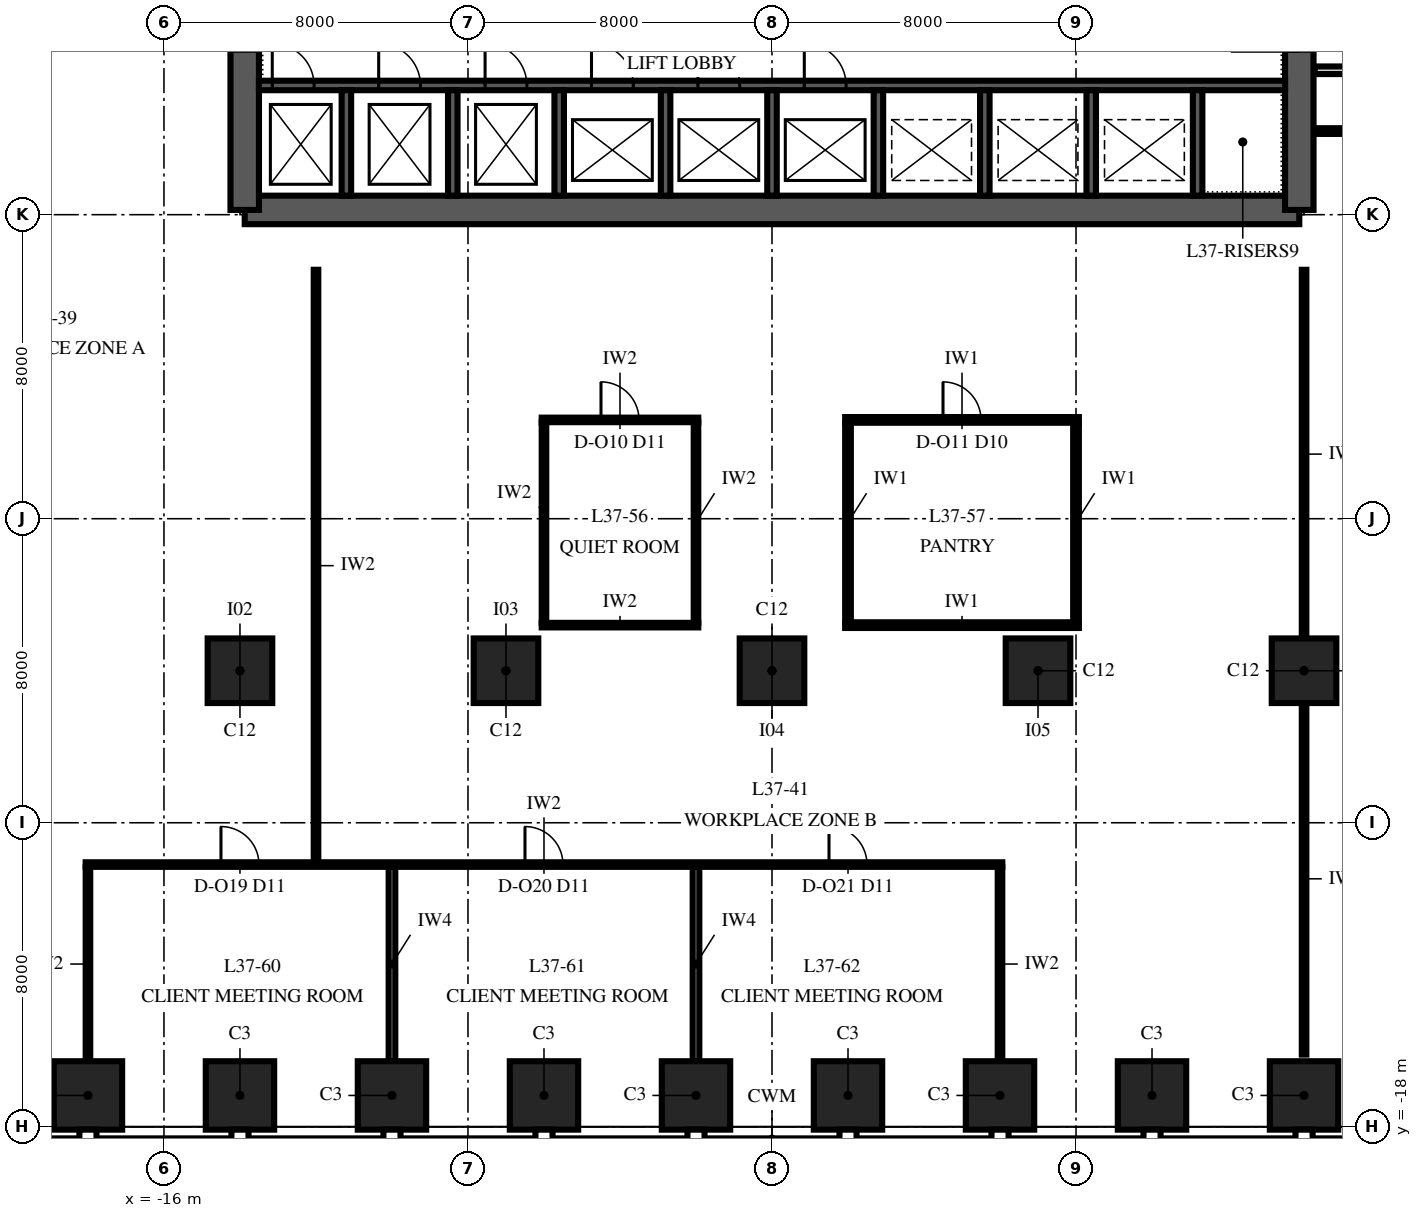
"""IFC4 building model, lengths in metres.
Left out: names, types, materials, properties, quantities, classifications, styles, units other than length and angle.
Written with IfcOpenShell. Run it as: python <this file> out.ifc"""

import sys

from ifc_helpers import new_model, si_unit, direction, frame, frame_2d, origin, origin_2d, place, context, subcontext, project, spatial, polyline, rectangle, outline, extrude, element, fill, save


model = new_model("IFC4")
c1 = context("Model", 3, precision=1e-05, world=origin(), true_north=direction((0.0, 1.0)))
c2 = subcontext(c1, "Body", "Model", "MODEL_VIEW")
j1 = project(units=[si_unit("LENGTHUNIT", "METRE"), si_unit("PLANEANGLEUNIT", "RADIAN")], contexts=[c1])
p1 = place(None, origin())
s1 = spatial("IfcSite", under=j1, at=p1, CompositionType="ELEMENT")
p2 = place(p1, origin())
s2 = spatial("IfcBuilding", under=s1, at=p2, CompositionType="ELEMENT")
p3 = place(p2, frame((0.0, 0.0, 163.0)))
s3 = spatial("IfcBuildingStorey", under=s2, at=p3, CompositionType="ELEMENT", Elevation=163.0)
for number, where, z_axis, x_axis in (
    (1, (-18.0, -17.175, 0.0), (0.0, 0.0, 1.0), (1.0, 0.0, 0.0)),
    (2, (-14.0, -17.175, 0.0), (0.0, 0.0, 1.0), (1.0, 0.0, 0.0)),
    (3, (-10.0, -17.175, 0.0), (0.0, 0.0, 1.0), (1.0, 0.0, 0.0)),
    (4, (-6.0, -17.175, 0.0), (0.0, 0.0, 1.0), (1.0, 0.0, 0.0)),
    (5, (-2.0, -17.175, 0.0), (0.0, 0.0, 1.0), (1.0, 0.0, 0.0)),
    (6, (2.0, -17.175, 0.0), (0.0, 0.0, 1.0), (1.0, 0.0, 0.0)),
    (7, (6.0, -17.175, 0.0), (0.0, 0.0, 1.0), (1.0, 0.0, 0.0)),
    (8, (10.0, -17.175, 0.0), (0.0, 0.0, 1.0), (1.0, 0.0, 0.0)),
    (9, (14.0, -17.175, 0.0), (0.0, 0.0, 1.0), (1.0, 0.0, 0.0)),
):
    element("IfcColumn", number, at=place(p3, frame(where, z_axis=z_axis, x_axis=x_axis)), inside=s3, PredefinedType="COLUMN", context=c2, shape_type="SweptSolid", body=[
        extrude(rectangle(XDim=1.8, YDim=1.8, at=origin_2d()), origin(), (0.0, 0.0, 1.0), 4.0),
    ])
for number, where, z_axis, x_axis in (
    (10, (-14.0, -6.0, 0.0), (0.0, 0.0, 1.0), (1.0, 0.0, 0.0)),
    (11, (-7.0, -6.0, 0.0), (0.0, 0.0, 1.0), (1.0, 0.0, 0.0)),
    (12, (0.0, -6.0, 0.0), (0.0, 0.0, 1.0), (1.0, 0.0, 0.0)),
    (13, (7.0, -6.0, 0.0), (0.0, 0.0, 1.0), (1.0, 0.0, 0.0)),
    (14, (14.0, -6.0, 0.0), (0.0, 0.0, 1.0), (1.0, 0.0, 0.0)),
):
    element("IfcColumn", number, at=place(p3, frame(where, z_axis=z_axis, x_axis=x_axis)), inside=s3, PredefinedType="COLUMN", context=c2, shape_type="SweptSolid", body=[
        extrude(rectangle(XDim=1.7, YDim=1.7, at=origin_2d()), origin(), (0.0, 0.0, 1.0), 4.0),
    ])
p4 = place(p3, frame((-13.875, 6.125, 0.0), z_axis=(0.0, 0.0, 1.0), x_axis=(1.0, 0.0, 0.0)))
e15 = element("IfcWall", 15, at=p4, inside=s3, PredefinedType="SHEAR", context=c2, shape_type="SweptSolid", body=[
    extrude(rectangle(XDim=27.75, YDim=0.75, at=frame_2d((13.875, 0.0))), origin(), (0.0, 0.0, 1.0), 4.0),
])
p5 = place(p3, frame((13.875, 6.125, 0.0), z_axis=(0.0, 0.0, 1.0), x_axis=(0.0, 1.0, 0.0)))
e16 = element("IfcWall", 16, at=p5, inside=s3, PredefinedType="SHEAR", context=c2, shape_type="SweptSolid", body=[
    extrude(outline(polyline([(0.0, -0.375), (17.75, -0.375), (17.75, 0.0), (17.375, 0.0), (17.375, 0.375), (0.375, 0.375), (0.375, 0.0), (0.0, 0.0), (0.0, -0.375)])), origin(), (0.0, 0.0, 1.0), 4.0),
])
p6 = place(p5, frame((4.175, 0.0, 0.0)))
e17 = element("IfcOpeningElement", 17, at=p6, cuts=e16, PredefinedType="OPENING", context=c2, shape_type="SweptSolid", body=[
    extrude(rectangle(XDim=1.8, YDim=2.4, at=frame_2d((0.9, 1.2))), frame((0.0, 0.39, 0.0), z_axis=(0.0, -1.0, 0.0), x_axis=(1.0, 0.0, 0.0)), (0.0, 0.0, 1.0), 0.78),
])
p7 = place(p3, frame((-13.875, 23.875, 0.0), z_axis=(0.0, 0.0, 1.0), x_axis=(0.0, -1.0, 0.0)))
e18 = element("IfcWall", 18, at=p7, inside=s3, PredefinedType="SHEAR", context=c2, shape_type="SweptSolid", body=[
    extrude(outline(polyline([(0.0, -0.375), (17.75, -0.375), (17.75, 0.0), (17.375, 0.0), (17.375, 0.375), (0.375, 0.375), (0.375, 0.0), (0.0, 0.0), (0.0, -0.375)])), origin(), (0.0, 0.0, 1.0), 4.0),
])
p8 = place(p7, frame((11.775, 0.0, 0.0)))
e19 = element("IfcOpeningElement", 19, at=p8, cuts=e18, PredefinedType="OPENING", context=c2, shape_type="SweptSolid", body=[
    extrude(rectangle(XDim=1.8, YDim=2.4, at=frame_2d((0.9, 1.2))), frame((0.0, 0.39, 0.0), z_axis=(0.0, -1.0, 0.0), x_axis=(1.0, 0.0, 0.0)), (0.0, 0.0, 1.0), 0.78),
])
p9 = place(p3, frame((-13.5, 9.4, 0.0), z_axis=(0.0, 0.0, 1.0), x_axis=(1.0, 0.0, 0.0)))
e20 = element("IfcWall", 20, at=p9, inside=s3, PredefinedType="SHEAR", context=c2, shape_type="SweptSolid", body=[
    extrude(rectangle(XDim=27.0, YDim=0.25, at=frame_2d((13.5, 0.0))), origin(), (0.0, 0.0, 1.0), 4.0),
])
p10 = place(p9, frame((0.35, 0.0, 0.0)))
e21 = element("IfcOpeningElement", 21, at=p10, cuts=e20, PredefinedType="OPENING", context=c2, shape_type="SweptSolid", body=[
    extrude(rectangle(XDim=1.1, YDim=2.1, at=frame_2d((0.55, 1.05))), frame((0.0, 0.14, 0.0), z_axis=(0.0, -1.0, 0.0), x_axis=(1.0, 0.0, 0.0)), (0.0, 0.0, 1.0), 0.28),
])
p11 = place(p9, frame((3.15, 0.0, 0.0)))
e22 = element("IfcOpeningElement", 22, at=p11, cuts=e20, PredefinedType="OPENING", context=c2, shape_type="SweptSolid", body=[
    extrude(rectangle(XDim=1.1, YDim=2.1, at=frame_2d((0.55, 1.05))), frame((0.0, 0.14, 0.0), z_axis=(0.0, -1.0, 0.0), x_axis=(1.0, 0.0, 0.0)), (0.0, 0.0, 1.0), 0.28),
])
p12 = place(p9, frame((5.95, 0.0, 0.0)))
e23 = element("IfcOpeningElement", 23, at=p12, cuts=e20, PredefinedType="OPENING", context=c2, shape_type="SweptSolid", body=[
    extrude(rectangle(XDim=1.1, YDim=2.1, at=frame_2d((0.55, 1.05))), frame((0.0, 0.14, 0.0), z_axis=(0.0, -1.0, 0.0), x_axis=(1.0, 0.0, 0.0)), (0.0, 0.0, 1.0), 0.28),
])
p13 = place(p9, frame((8.75, 0.0, 0.0)))
e24 = element("IfcOpeningElement", 24, at=p13, cuts=e20, PredefinedType="OPENING", context=c2, shape_type="SweptSolid", body=[
    extrude(rectangle(XDim=1.1, YDim=2.1, at=frame_2d((0.55, 1.05))), frame((0.0, 0.14, 0.0), z_axis=(0.0, -1.0, 0.0), x_axis=(1.0, 0.0, 0.0)), (0.0, 0.0, 1.0), 0.28),
])
p14 = place(p9, frame((11.55, 0.0, 0.0)))
e25 = element("IfcOpeningElement", 25, at=p14, cuts=e20, PredefinedType="OPENING", context=c2, shape_type="SweptSolid", body=[
    extrude(rectangle(XDim=1.1, YDim=2.1, at=frame_2d((0.55, 1.05))), frame((0.0, 0.14, 0.0), z_axis=(0.0, -1.0, 0.0), x_axis=(1.0, 0.0, 0.0)), (0.0, 0.0, 1.0), 0.28),
])
p15 = place(p9, frame((14.35, 0.0, 0.0)))
e26 = element("IfcOpeningElement", 26, at=p15, cuts=e20, PredefinedType="OPENING", context=c2, shape_type="SweptSolid", body=[
    extrude(rectangle(XDim=1.1, YDim=2.1, at=frame_2d((0.55, 1.05))), frame((0.0, 0.14, 0.0), z_axis=(0.0, -1.0, 0.0), x_axis=(1.0, 0.0, 0.0)), (0.0, 0.0, 1.0), 0.28),
])
for number, where, z_axis, x_axis in (
    (27, (-11.2, 6.5, 0.0), (0.0, 0.0, 1.0), (0.0, 1.0, 0.0)),
    (28, (-8.4, 6.5, 0.0), (0.0, 0.0, 1.0), (0.0, 1.0, 0.0)),
    (29, (-5.6, 6.5, 0.0), (0.0, 0.0, 1.0), (0.0, 1.0, 0.0)),
    (30, (-2.8, 6.5, 0.0), (0.0, 0.0, 1.0), (0.0, 1.0, 0.0)),
    (31, (0.0, 6.5, 0.0), (0.0, 0.0, 1.0), (0.0, 1.0, 0.0)),
    (32, (2.8, 6.5, 0.0), (0.0, 0.0, 1.0), (0.0, 1.0, 0.0)),
    (33, (5.6, 6.5, 0.0), (0.0, 0.0, 1.0), (0.0, 1.0, 0.0)),
    (34, (8.4, 6.5, 0.0), (0.0, 0.0, 1.0), (0.0, 1.0, 0.0)),
    (35, (11.2, 6.5, 0.0), (0.0, 0.0, 1.0), (0.0, 1.0, 0.0)),
):
    element("IfcWall", number, at=place(p3, frame(where, z_axis=z_axis, x_axis=x_axis)), inside=s3, PredefinedType="SHEAR", context=c2, shape_type="SweptSolid", body=[
        extrude(rectangle(XDim=2.775, YDim=0.25, at=frame_2d((1.387, 0.0))), origin(), (0.0, 0.0, 1.0), 4.0),
    ])
p16 = place(p3, frame((-18.06, -11.1, 0.0), z_axis=(0.0, 0.0, 1.0), x_axis=(1.0, 0.0, 0.0)))
e36 = element("IfcWall", 36, at=p16, inside=s3, PredefinedType="PARTITIONING", context=c2, shape_type="SweptSolid", body=[
    extrude(rectangle(XDim=24.12, YDim=0.12, at=frame_2d((12.06, 0.0))), origin(), (0.0, 0.0, 1.0), 3.13),
])
p17 = place(p16, frame((3.56, 0.0, 0.0)))
e37 = element("IfcOpeningElement", 37, at=p17, cuts=e36, PredefinedType="OPENING", context=c2, shape_type="SweptSolid", body=[
    extrude(rectangle(XDim=1.0, YDim=2.4, at=frame_2d((0.5, 1.2))), frame((0.0, 0.075, 0.0), z_axis=(0.0, -1.0, 0.0), x_axis=(1.0, 0.0, 0.0)), (0.0, 0.0, 1.0), 0.15),
])
p18 = place(p16, frame((11.56, 0.0, 0.0)))
e38 = element("IfcOpeningElement", 38, at=p18, cuts=e36, PredefinedType="OPENING", context=c2, shape_type="SweptSolid", body=[
    extrude(rectangle(XDim=1.0, YDim=2.4, at=frame_2d((0.5, 1.2))), frame((0.0, 0.075, 0.0), z_axis=(0.0, -1.0, 0.0), x_axis=(1.0, 0.0, 0.0)), (0.0, 0.0, 1.0), 0.15),
])
p19 = place(p16, frame((19.56, 0.0, 0.0)))
e39 = element("IfcOpeningElement", 39, at=p19, cuts=e36, PredefinedType="OPENING", context=c2, shape_type="SweptSolid", body=[
    extrude(rectangle(XDim=1.0, YDim=2.4, at=frame_2d((0.5, 1.2))), frame((0.0, 0.075, 0.0), z_axis=(0.0, -1.0, 0.0), x_axis=(1.0, 0.0, 0.0)), (0.0, 0.0, 1.0), 0.15),
])
p20 = place(p3, frame((-6.06, -4.8, 0.0), z_axis=(0.0, 0.0, 1.0), x_axis=(1.0, 0.0, 0.0)))
e40 = element("IfcWall", 40, at=p20, inside=s3, PredefinedType="PARTITIONING", context=c2, shape_type="SweptSolid", body=[
    extrude(rectangle(XDim=4.12, YDim=0.12, at=frame_2d((2.06, 0.0))), origin(), (0.0, 0.0, 1.0), 3.13),
])
p21 = place(p3, frame((1.925, -4.8, 0.0), z_axis=(0.0, 0.0, 1.0), x_axis=(1.0, 0.0, 0.0)))
e41 = element("IfcWall", 41, at=p21, inside=s3, PredefinedType="PARTITIONING", context=c2, shape_type="SweptSolid", body=[
    extrude(rectangle(XDim=6.15, YDim=0.15, at=frame_2d((3.075, 0.0))), origin(), (0.0, 0.0, 1.0), 3.13),
])
p22 = place(p3, frame((-6.06, 0.6, 0.0), z_axis=(0.0, 0.0, 1.0), x_axis=(1.0, 0.0, 0.0)))
e42 = element("IfcWall", 42, at=p22, inside=s3, PredefinedType="PARTITIONING", context=c2, shape_type="SweptSolid", body=[
    extrude(rectangle(XDim=4.12, YDim=0.12, at=frame_2d((2.06, 0.0))), origin(), (0.0, 0.0, 1.0), 3.13),
])
p23 = place(p22, frame((1.56, 0.0, 0.0)))
e43 = element("IfcOpeningElement", 43, at=p23, cuts=e42, PredefinedType="OPENING", context=c2, shape_type="SweptSolid", body=[
    extrude(rectangle(XDim=1.0, YDim=2.4, at=frame_2d((0.5, 1.2))), frame((0.0, 0.075, 0.0), z_axis=(0.0, -1.0, 0.0), x_axis=(1.0, 0.0, 0.0)), (0.0, 0.0, 1.0), 0.15),
])
p24 = place(p3, frame((1.925, 0.6, 0.0), z_axis=(0.0, 0.0, 1.0), x_axis=(1.0, 0.0, 0.0)))
e44 = element("IfcWall", 44, at=p24, inside=s3, PredefinedType="PARTITIONING", context=c2, shape_type="SweptSolid", body=[
    extrude(rectangle(XDim=6.15, YDim=0.15, at=frame_2d((3.075, 0.0))), origin(), (0.0, 0.0, 1.0), 3.13),
])
p25 = place(p24, frame((2.575, 0.0, 0.0)))
e45 = element("IfcOpeningElement", 45, at=p25, cuts=e44, PredefinedType="OPENING", context=c2, shape_type="SweptSolid", body=[
    extrude(rectangle(XDim=1.0, YDim=2.3, at=frame_2d((0.5, 1.15))), frame((0.0, 0.09, 0.0), z_axis=(0.0, -1.0, 0.0), x_axis=(1.0, 0.0, 0.0)), (0.0, 0.0, 1.0), 0.18),
])
p26 = place(p3, frame((14.28, 8.2, 0.0), z_axis=(0.0, 0.0, 1.0), x_axis=(1.0, 0.0, 0.0)))
e46 = element("IfcWall", 46, at=p26, inside=s3, PredefinedType="PARTITIONING", context=c2, shape_type="SweptSolid", body=[
    extrude(rectangle(XDim=6.045, YDim=0.15, at=frame_2d((3.022, 0.0))), origin(), (0.0, 0.0, 1.0), 3.75),
])
p27 = place(p3, frame((14.28, 9.8, 0.0), z_axis=(0.0, 0.0, 1.0), x_axis=(1.0, 0.0, 0.0)))
e47 = element("IfcWall", 47, at=p27, inside=s3, PredefinedType="PARTITIONING", context=c2, shape_type="SweptSolid", body=[
    extrude(rectangle(XDim=2.02, YDim=0.2, at=frame_2d((1.01, 0.0))), origin(), (0.0, 0.0, 1.0), 3.75),
])
p28 = place(p3, frame((-18.0, -16.275, 0.0), z_axis=(0.0, 0.0, 1.0), x_axis=(0.0, 1.0, 0.0)))
e48 = element("IfcWall", 48, at=p28, inside=s3, PredefinedType="PARTITIONING", context=c2, shape_type="SweptSolid", body=[
    extrude(rectangle(XDim=5.115, YDim=0.12, at=frame_2d((2.558, 0.0))), origin(), (0.0, 0.0, 1.0), 3.13),
])
p29 = place(p3, frame((-10.0, -16.275, 0.0), z_axis=(0.0, 0.0, 1.0), x_axis=(0.0, 1.0, 0.0)))
e49 = element("IfcWall", 49, at=p29, inside=s3, PredefinedType="PARTITIONING", context=c2, shape_type="SweptSolid", body=[
    extrude(rectangle(XDim=5.115, YDim=0.175, at=frame_2d((2.558, 0.0))), origin(), (0.0, 0.0, 1.0), 3.13),
])
p30 = place(p3, frame((-6.0, -4.74, 0.0), z_axis=(0.0, 0.0, 1.0), x_axis=(0.0, 1.0, 0.0)))
e50 = element("IfcWall", 50, at=p30, inside=s3, PredefinedType="PARTITIONING", context=c2, shape_type="SweptSolid", body=[
    extrude(rectangle(XDim=5.28, YDim=0.12, at=frame_2d((2.64, 0.0))), origin(), (0.0, 0.0, 1.0), 3.13),
])
p31 = place(p3, frame((-2.0, -16.275, 0.0), z_axis=(0.0, 0.0, 1.0), x_axis=(0.0, 1.0, 0.0)))
e51 = element("IfcWall", 51, at=p31, inside=s3, PredefinedType="PARTITIONING", context=c2, shape_type="SweptSolid", body=[
    extrude(rectangle(XDim=5.115, YDim=0.175, at=frame_2d((2.558, 0.0))), origin(), (0.0, 0.0, 1.0), 3.13),
])
p32 = place(p3, frame((-2.0, -4.74, 0.0), z_axis=(0.0, 0.0, 1.0), x_axis=(0.0, 1.0, 0.0)))
e52 = element("IfcWall", 52, at=p32, inside=s3, PredefinedType="PARTITIONING", context=c2, shape_type="SweptSolid", body=[
    extrude(rectangle(XDim=5.28, YDim=0.12, at=frame_2d((2.64, 0.0))), origin(), (0.0, 0.0, 1.0), 3.13),
])
p33 = place(p3, frame((2.0, -4.725, 0.0), z_axis=(0.0, 0.0, 1.0), x_axis=(0.0, 1.0, 0.0)))
e53 = element("IfcWall", 53, at=p33, inside=s3, PredefinedType="PARTITIONING", context=c2, shape_type="SweptSolid", body=[
    extrude(rectangle(XDim=5.25, YDim=0.15, at=frame_2d((2.625, 0.0))), origin(), (0.0, 0.0, 1.0), 3.13),
])
p34 = place(p3, frame((6.0, -16.275, 0.0), z_axis=(0.0, 0.0, 1.0), x_axis=(0.0, 1.0, 0.0)))
e54 = element("IfcWall", 54, at=p34, inside=s3, PredefinedType="PARTITIONING", context=c2, shape_type="SweptSolid", body=[
    extrude(rectangle(XDim=5.115, YDim=0.12, at=frame_2d((2.558, 0.0))), origin(), (0.0, 0.0, 1.0), 3.13),
])
p35 = place(p3, frame((8.0, -4.725, 0.0), z_axis=(0.0, 0.0, 1.0), x_axis=(0.0, 1.0, 0.0)))
e55 = element("IfcWall", 55, at=p35, inside=s3, PredefinedType="PARTITIONING", context=c2, shape_type="SweptSolid", body=[
    extrude(rectangle(XDim=5.25, YDim=0.15, at=frame_2d((2.625, 0.0))), origin(), (0.0, 0.0, 1.0), 3.75),
])
p36 = place(p3, frame((-11.999, -11.02, 0.0), z_axis=(0.0, 0.0, 1.0), x_axis=(0.0, 1.0, 0.0)))
e56 = element("IfcWall", 56, at=p36, inside=s3, PredefinedType="PARTITIONING", context=c2, shape_type="SweptSolid", body=[
    extrude(rectangle(XDim=15.57, YDim=0.12, at=frame_2d((7.785, 0.0))), origin(), (0.0, 0.0, 1.0), 2.742),
])
p37 = place(p3, frame((14.001, -16.1, 0.0), z_axis=(0.0, 0.0, 1.0), x_axis=(0.0, 1.0, 0.0)))
e57 = element("IfcWall", 57, at=p37, inside=s3, PredefinedType="PARTITIONING", context=c2, shape_type="SweptSolid", body=[
    extrude(rectangle(XDim=9.25, YDim=0.12, at=frame_2d((4.625, 0.0))), origin(), (0.0, 0.0, 1.0), 3.13),
])
p38 = place(p3, frame((14.001, -5.15, 0.0), z_axis=(0.0, 0.0, 1.0), x_axis=(0.0, 1.0, 0.0)))
e58 = element("IfcWall", 58, at=p38, inside=s3, PredefinedType="PARTITIONING", context=c2, shape_type="SweptSolid", body=[
    extrude(rectangle(XDim=9.7, YDim=0.12, at=frame_2d((4.85, 0.0))), origin(), (0.0, 0.0, 1.0), 3.13),
])
p39 = place(p10, origin())
e59 = element("IfcDoor", 59, at=p39, inside=s3, OperationType="SLIDING_TO_LEFT", PredefinedType="DOOR", context=c2, shape_type="SweptSolid", body=[
    extrude(rectangle(XDim=1.1, YDim=2.1, at=frame_2d((0.55, 1.05))), frame((0.0, 0.125, 0.0), z_axis=(0.0, -1.0, 0.0), x_axis=(1.0, 0.0, 0.0)), (0.0, 0.0, 1.0), 0.25),
])
fill(e21, e59)
p40 = place(p11, origin())
e60 = element("IfcDoor", 60, at=p40, inside=s3, OperationType="SLIDING_TO_LEFT", PredefinedType="DOOR", context=c2, shape_type="SweptSolid", body=[
    extrude(rectangle(XDim=1.1, YDim=2.1, at=frame_2d((0.55, 1.05))), frame((0.0, 0.125, 0.0), z_axis=(0.0, -1.0, 0.0), x_axis=(1.0, 0.0, 0.0)), (0.0, 0.0, 1.0), 0.25),
])
fill(e22, e60)
p41 = place(p12, origin())
e61 = element("IfcDoor", 61, at=p41, inside=s3, OperationType="SLIDING_TO_LEFT", PredefinedType="DOOR", context=c2, shape_type="SweptSolid", body=[
    extrude(rectangle(XDim=1.1, YDim=2.1, at=frame_2d((0.55, 1.05))), frame((0.0, 0.125, 0.0), z_axis=(0.0, -1.0, 0.0), x_axis=(1.0, 0.0, 0.0)), (0.0, 0.0, 1.0), 0.25),
])
fill(e23, e61)
p42 = place(p13, origin())
e62 = element("IfcDoor", 62, at=p42, inside=s3, OperationType="SLIDING_TO_LEFT", PredefinedType="DOOR", context=c2, shape_type="SweptSolid", body=[
    extrude(rectangle(XDim=1.1, YDim=2.1, at=frame_2d((0.55, 1.05))), frame((0.0, 0.125, 0.0), z_axis=(0.0, -1.0, 0.0), x_axis=(1.0, 0.0, 0.0)), (0.0, 0.0, 1.0), 0.25),
])
fill(e24, e62)
p43 = place(p14, origin())
e63 = element("IfcDoor", 63, at=p43, inside=s3, OperationType="SLIDING_TO_LEFT", PredefinedType="DOOR", context=c2, shape_type="SweptSolid", body=[
    extrude(rectangle(XDim=1.1, YDim=2.1, at=frame_2d((0.55, 1.05))), frame((0.0, 0.125, 0.0), z_axis=(0.0, -1.0, 0.0), x_axis=(1.0, 0.0, 0.0)), (0.0, 0.0, 1.0), 0.25),
])
fill(e25, e63)
p44 = place(p15, origin())
e64 = element("IfcDoor", 64, at=p44, inside=s3, OperationType="SLIDING_TO_LEFT", PredefinedType="DOOR", context=c2, shape_type="SweptSolid", body=[
    extrude(rectangle(XDim=1.1, YDim=2.1, at=frame_2d((0.55, 1.05))), frame((0.0, 0.125, 0.0), z_axis=(0.0, -1.0, 0.0), x_axis=(1.0, 0.0, 0.0)), (0.0, 0.0, 1.0), 0.25),
])
fill(e26, e64)
p45 = place(p23, origin())
e65 = element("IfcDoor", 65, at=p45, inside=s3, OperationType="SINGLE_SWING_RIGHT", PredefinedType="DOOR", context=c2, shape_type="SweptSolid", body=[
    extrude(rectangle(XDim=1.0, YDim=2.4, at=frame_2d((0.5, 1.2))), frame((0.0, 0.06, 0.0), z_axis=(0.0, -1.0, 0.0), x_axis=(1.0, 0.0, 0.0)), (0.0, 0.0, 1.0), 0.12),
])
fill(e43, e65)
p46 = place(p25, origin())
e66 = element("IfcDoor", 66, at=p46, inside=s3, OperationType="SINGLE_SWING_LEFT", PredefinedType="DOOR", context=c2, shape_type="SweptSolid", body=[
    extrude(rectangle(XDim=1.0, YDim=2.3, at=frame_2d((0.5, 1.15))), frame((0.0, 0.075, 0.0), z_axis=(0.0, -1.0, 0.0), x_axis=(1.0, 0.0, 0.0)), (0.0, 0.0, 1.0), 0.149),
])
fill(e45, e66)
p47 = place(p17, origin())
e67 = element("IfcDoor", 67, at=p47, inside=s3, OperationType="SINGLE_SWING_RIGHT", PredefinedType="DOOR", context=c2, shape_type="SweptSolid", body=[
    extrude(rectangle(XDim=1.0, YDim=2.4, at=frame_2d((0.5, 1.2))), frame((0.0, 0.06, 0.0), z_axis=(0.0, -1.0, 0.0), x_axis=(1.0, 0.0, 0.0)), (0.0, 0.0, 1.0), 0.12),
])
fill(e37, e67)
p48 = place(p18, origin())
e68 = element("IfcDoor", 68, at=p48, inside=s3, OperationType="SINGLE_SWING_RIGHT", PredefinedType="DOOR", context=c2, shape_type="SweptSolid", body=[
    extrude(rectangle(XDim=1.0, YDim=2.4, at=frame_2d((0.5, 1.2))), frame((0.0, 0.06, 0.0), z_axis=(0.0, -1.0, 0.0), x_axis=(1.0, 0.0, 0.0)), (0.0, 0.0, 1.0), 0.12),
])
fill(e38, e68)
p49 = place(p19, origin())
e69 = element("IfcDoor", 69, at=p49, inside=s3, OperationType="SINGLE_SWING_RIGHT", PredefinedType="DOOR", context=c2, shape_type="SweptSolid", body=[
    extrude(rectangle(XDim=1.0, YDim=2.4, at=frame_2d((0.5, 1.2))), frame((0.0, 0.06, 0.0), z_axis=(0.0, -1.0, 0.0), x_axis=(1.0, 0.0, 0.0)), (0.0, 0.0, 1.0), 0.12),
])
fill(e39, e69)
save(model, sys.argv[1])
